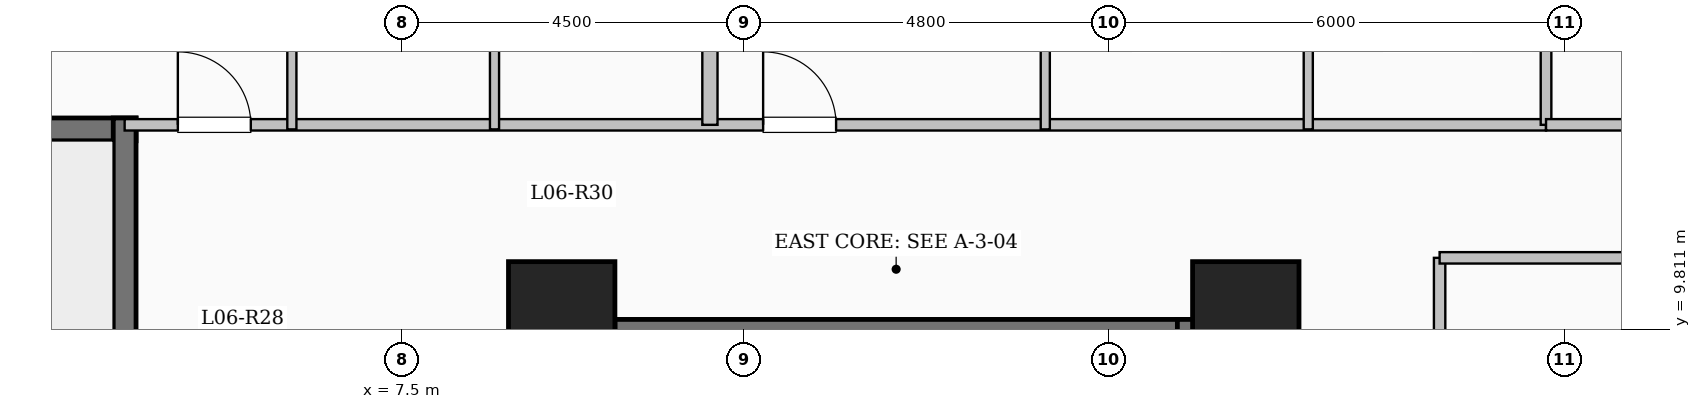
"""IFC4 building model, lengths in metres.
Left out: names, types, materials, properties, quantities, classifications, styles, units other than length and angle.
Written with IfcOpenShell. Run it as: python <this file> out.ifc"""

import sys

from ifc_helpers import new_model, si_unit, direction, frame, frame_2d, origin, origin_2d, place, context, subcontext, project, spatial, rectangle, extrude, element, fill, save


model = new_model("IFC4")
c1 = context("Model", 3, precision=1e-05, world=origin(), true_north=direction((0.0, 1.0)))
c2 = subcontext(c1, "Body", "Model", "MODEL_VIEW")
j1 = project(units=[si_unit("LENGTHUNIT", "METRE"), si_unit("PLANEANGLEUNIT", "RADIAN")], contexts=[c1])
p1 = place(None, origin())
s1 = spatial("IfcSite", under=j1, at=p1, CompositionType="ELEMENT")
p2 = place(p1, origin())
s2 = spatial("IfcBuilding", under=s1, at=p2, CompositionType="ELEMENT")
p3 = place(p2, frame((0.0, 0.0, 27.35)))
s3 = spatial("IfcBuildingStorey", under=s2, at=p3, CompositionType="ELEMENT", Elevation=27.35)
for number, where, z_axis, x_axis in (
    (1, (9.6, 10.0, 0.0), (0.0, 0.0, 1.0), (1.0, 0.0, 0.0)),
    (2, (18.6, 10.0, 0.0), (0.0, 0.0, 1.0), (1.0, 0.0, 0.0)),
):
    element("IfcColumn", number, at=place(p3, frame(where, z_axis=z_axis, x_axis=x_axis)), inside=s3, PredefinedType="COLUMN", context=c2, shape_type="SweptSolid", body=[
        extrude(rectangle(XDim=1.4, YDim=1.4, at=origin_2d()), origin(), (0.0, 0.0, 1.0), 3.35),
    ])
p4 = place(p3, frame((10.0, 9.79, 0.0), z_axis=(0.0, 0.0, 1.0), x_axis=(1.0, 0.0, 0.0)))
e3 = element("IfcWall", 3, at=p4, inside=s3, PredefinedType="SHEAR", context=c2, shape_type="SweptSolid", body=[
    extrude(rectangle(XDim=8.0, YDim=0.3, at=frame_2d((4.0, 0.0))), origin(), (0.0, 0.0, 1.0), 3.35),
])
for number, where, z_axis, x_axis in (
    (4, (10.15, 6.35, 0.0), (0.0, 0.0, 1.0), (0.0, 1.0, 0.0)),
    (5, (17.85, 6.35, 0.0), (0.0, 0.0, 1.0), (0.0, 1.0, 0.0)),
):
    element("IfcWall", number, at=place(p3, frame(where, z_axis=z_axis, x_axis=x_axis)), inside=s3, PredefinedType="SHEAR", context=c2, shape_type="SweptSolid", body=[
        extrude(rectangle(XDim=3.59, YDim=0.3, at=frame_2d((1.795, 0.0))), origin(), (0.0, 0.0, 1.0), 3.35),
    ])
p5 = place(p3, frame((-4.0, 12.44, 0.0), z_axis=(0.0, 0.0, 1.0), x_axis=(1.0, 0.0, 0.0)))
e6 = element("IfcWall", 6, at=p5, inside=s3, PredefinedType="SHEAR", context=c2, shape_type="SweptSolid", body=[
    extrude(rectangle(XDim=8.0, YDim=0.3, at=frame_2d((4.0, 0.0))), origin(), (0.0, 0.0, 1.0), 3.35),
])
p6 = place(p3, frame((3.85, 9.0, 0.0), z_axis=(0.0, 0.0, 1.0), x_axis=(0.0, 1.0, 0.0)))
e7 = element("IfcWall", 7, at=p6, inside=s3, PredefinedType="SHEAR", context=c2, shape_type="SweptSolid", body=[
    extrude(rectangle(XDim=3.59, YDim=0.3, at=frame_2d((1.795, 0.0))), origin(), (0.0, 0.0, 1.0), 3.35),
])
p7 = place(p3, frame((3.85, 12.5, 0.0), z_axis=(0.0, 0.0, 1.0), x_axis=(1.0, 0.0, 0.0)))
e8 = element("IfcWall", 8, at=p7, inside=s3, PredefinedType="PARTITIONING", context=c2, shape_type="SweptSolid", body=[
    extrude(rectangle(XDim=18.7, YDim=0.15, at=frame_2d((9.35, 0.0))), origin(), (0.0, 0.0, 1.0), 3.1),
])
p8 = place(p7, frame((0.7, 0.0, 0.0)))
e9 = element("IfcOpeningElement", 9, at=p8, cuts=e8, PredefinedType="OPENING", context=c2, shape_type="SweptSolid", body=[
    extrude(rectangle(XDim=0.96, YDim=2.15, at=frame_2d((0.48, 1.075))), frame((0.0, 0.085, 0.0), z_axis=(0.0, -1.0, 0.0), x_axis=(1.0, 0.0, 0.0)), (0.0, 0.0, 1.0), 0.17),
])
p9 = place(p7, frame((8.4, 0.0, 0.0)))
e10 = element("IfcOpeningElement", 10, at=p9, cuts=e8, PredefinedType="OPENING", context=c2, shape_type="SweptSolid", body=[
    extrude(rectangle(XDim=0.96, YDim=2.15, at=frame_2d((0.48, 1.075))), frame((0.0, 0.085, 0.0), z_axis=(0.0, -1.0, 0.0), x_axis=(1.0, 0.0, 0.0)), (0.0, 0.0, 1.0), 0.17),
])
p10 = place(p3, frame((21.15, -7.25, 0.0), z_axis=(0.0, 0.0, 1.0), x_axis=(0.0, 1.0, 0.0)))
e11 = element("IfcWall", 11, at=p10, inside=s3, PredefinedType="PARTITIONING", context=c2, shape_type="SweptSolid", body=[
    extrude(rectangle(XDim=18.0, YDim=0.15, at=frame_2d((9.0, 0.0))), origin(), (0.0, 0.0, 1.0), 2.585),
])
p11 = place(p3, frame((11.55, 12.5, 0.0), z_axis=(0.0, 0.0, 1.0), x_axis=(0.0, 1.0, 0.0)))
e12 = element("IfcWall", 12, at=p11, inside=s3, PredefinedType="SOLIDWALL", context=c2, shape_type="SweptSolid", body=[
    extrude(rectangle(XDim=11.1, YDim=0.2, at=frame_2d((5.55, 0.0))), origin(), (0.0, 0.0, 1.0), 3.1),
])
p12 = place(p3, frame((6.05, 12.44, 0.0), z_axis=(0.0, 0.0, 1.0), x_axis=(0.0, 1.0, 0.0)))
e13 = element("IfcWall", 13, at=p12, inside=s3, PredefinedType="PARTITIONING", context=c2, shape_type="SweptSolid", body=[
    extrude(rectangle(XDim=12.381, YDim=0.12, at=frame_2d((6.19, 0.0))), origin(), (0.0, 0.0, 1.0), 3.1),
])
p13 = place(p12, frame((3.245, 0.0, 0.0)))
e14 = element("IfcOpeningElement", 14, at=p13, cuts=e13, PredefinedType="OPENING", context=c2, shape_type="SweptSolid", body=[
    extrude(rectangle(XDim=1.08, YDim=2.15, at=frame_2d((0.54, 1.075))), frame((0.0, 0.07, 0.0), z_axis=(0.0, -1.0, 0.0), x_axis=(1.0, 0.0, 0.0)), (0.0, 0.0, 1.0), 0.14),
])
p14 = place(p3, frame((8.716, 12.44, 0.0), z_axis=(0.0, 0.0, 1.0), x_axis=(0.0, 1.0, 0.0)))
e15 = element("IfcWall", 15, at=p14, inside=s3, PredefinedType="PARTITIONING", context=c2, shape_type="SweptSolid", body=[
    extrude(rectangle(XDim=2.96, YDim=0.12, at=frame_2d((1.48, 0.0))), origin(), (0.0, 0.0, 1.0), 3.1),
])
p15 = place(p3, frame((15.962, 12.44, 0.0), z_axis=(0.0, 0.0, 1.0), x_axis=(0.0, 1.0, 0.0)))
e16 = element("IfcWall", 16, at=p15, inside=s3, PredefinedType="PARTITIONING", context=c2, shape_type="SweptSolid", body=[
    extrude(rectangle(XDim=11.16, YDim=0.12, at=frame_2d((5.58, 0.0))), origin(), (0.0, 0.0, 1.0), 3.1),
])
p16 = place(p15, frame((2.735, 0.0, 0.0)))
e17 = element("IfcOpeningElement", 17, at=p16, cuts=e16, PredefinedType="OPENING", context=c2, shape_type="SweptSolid", body=[
    extrude(rectangle(XDim=1.08, YDim=2.15, at=frame_2d((0.54, 1.075))), frame((0.0, 0.07, 0.0), z_axis=(0.0, -1.0, 0.0), x_axis=(1.0, 0.0, 0.0)), (0.0, 0.0, 1.0), 0.14),
])
p17 = place(p3, frame((19.422, 12.44, 0.0), z_axis=(0.0, 0.0, 1.0), x_axis=(0.0, 1.0, 0.0)))
e18 = element("IfcWall", 18, at=p17, inside=s3, PredefinedType="PARTITIONING", context=c2, shape_type="SweptSolid", body=[
    extrude(rectangle(XDim=2.45, YDim=0.12, at=frame_2d((1.225, 0.0))), origin(), (0.0, 0.0, 1.0), 3.1),
])
p18 = place(p3, frame((21.15, 10.75, 0.0), z_axis=(0.0, 0.0, 1.0), x_axis=(1.0, 0.0, 0.0)))
e19 = element("IfcWall", 19, at=p18, inside=s3, PredefinedType="PARTITIONING", context=c2, shape_type="SweptSolid", body=[
    extrude(rectangle(XDim=7.53, YDim=0.15, at=frame_2d((3.765, 0.0))), origin(), (0.0, 0.0, 1.0), 3.1),
])
p19 = place(p3, frame((22.55, 12.5, 0.0), z_axis=(0.0, 0.0, 1.0), x_axis=(0.0, 1.0, 0.0)))
e20 = element("IfcWall", 20, at=p19, inside=s3, PredefinedType="PARTITIONING", context=c2, shape_type="SweptSolid", body=[
    extrude(rectangle(XDim=6.55, YDim=0.14, at=frame_2d((3.275, 0.0))), origin(), (0.0, 0.0, 1.0), 3.1),
])
p20 = place(p3, frame((22.55, 12.5, 0.0), z_axis=(0.0, 0.0, 1.0), x_axis=(1.0, 0.0, 0.0)))
e21 = element("IfcWall", 21, at=p20, inside=s3, PredefinedType="PARTITIONING", context=c2, shape_type="SweptSolid", body=[
    extrude(rectangle(XDim=6.13, YDim=0.15, at=frame_2d((3.065, 0.0))), origin(), (0.0, 0.0, 1.0), 3.1),
])
p21 = place(p20, frame((2.59, 0.0, 0.0)))
e22 = element("IfcOpeningElement", 22, at=p21, cuts=e21, PredefinedType="OPENING", context=c2, shape_type="SweptSolid", body=[
    extrude(rectangle(XDim=0.95, YDim=2.15, at=frame_2d((0.475, 1.075))), frame((0.0, 0.085, 0.0), z_axis=(0.0, -1.0, 0.0), x_axis=(1.0, 0.0, 0.0)), (0.0, 0.0, 1.0), 0.17),
])
p22 = place(p8, origin())
e23 = element("IfcDoor", 23, at=p22, inside=s3, OperationType="SINGLE_SWING_LEFT", PredefinedType="DOOR", context=c2, shape_type="SweptSolid", body=[
    extrude(rectangle(XDim=0.96, YDim=2.15, at=frame_2d((0.48, 1.075))), frame((0.0, 0.025, 0.0), z_axis=(0.0, -1.0, 0.0), x_axis=(1.0, 0.0, 0.0)), (0.0, 0.0, 1.0), 0.05),
])
fill(e9, e23)
p23 = place(p9, origin())
e24 = element("IfcDoor", 24, at=p23, inside=s3, OperationType="SINGLE_SWING_LEFT", PredefinedType="DOOR", context=c2, shape_type="SweptSolid", body=[
    extrude(rectangle(XDim=0.96, YDim=2.15, at=frame_2d((0.48, 1.075))), frame((0.0, 0.025, 0.0), z_axis=(0.0, -1.0, 0.0), x_axis=(1.0, 0.0, 0.0)), (0.0, 0.0, 1.0), 0.05),
])
fill(e10, e24)
save(model, sys.argv[1])
